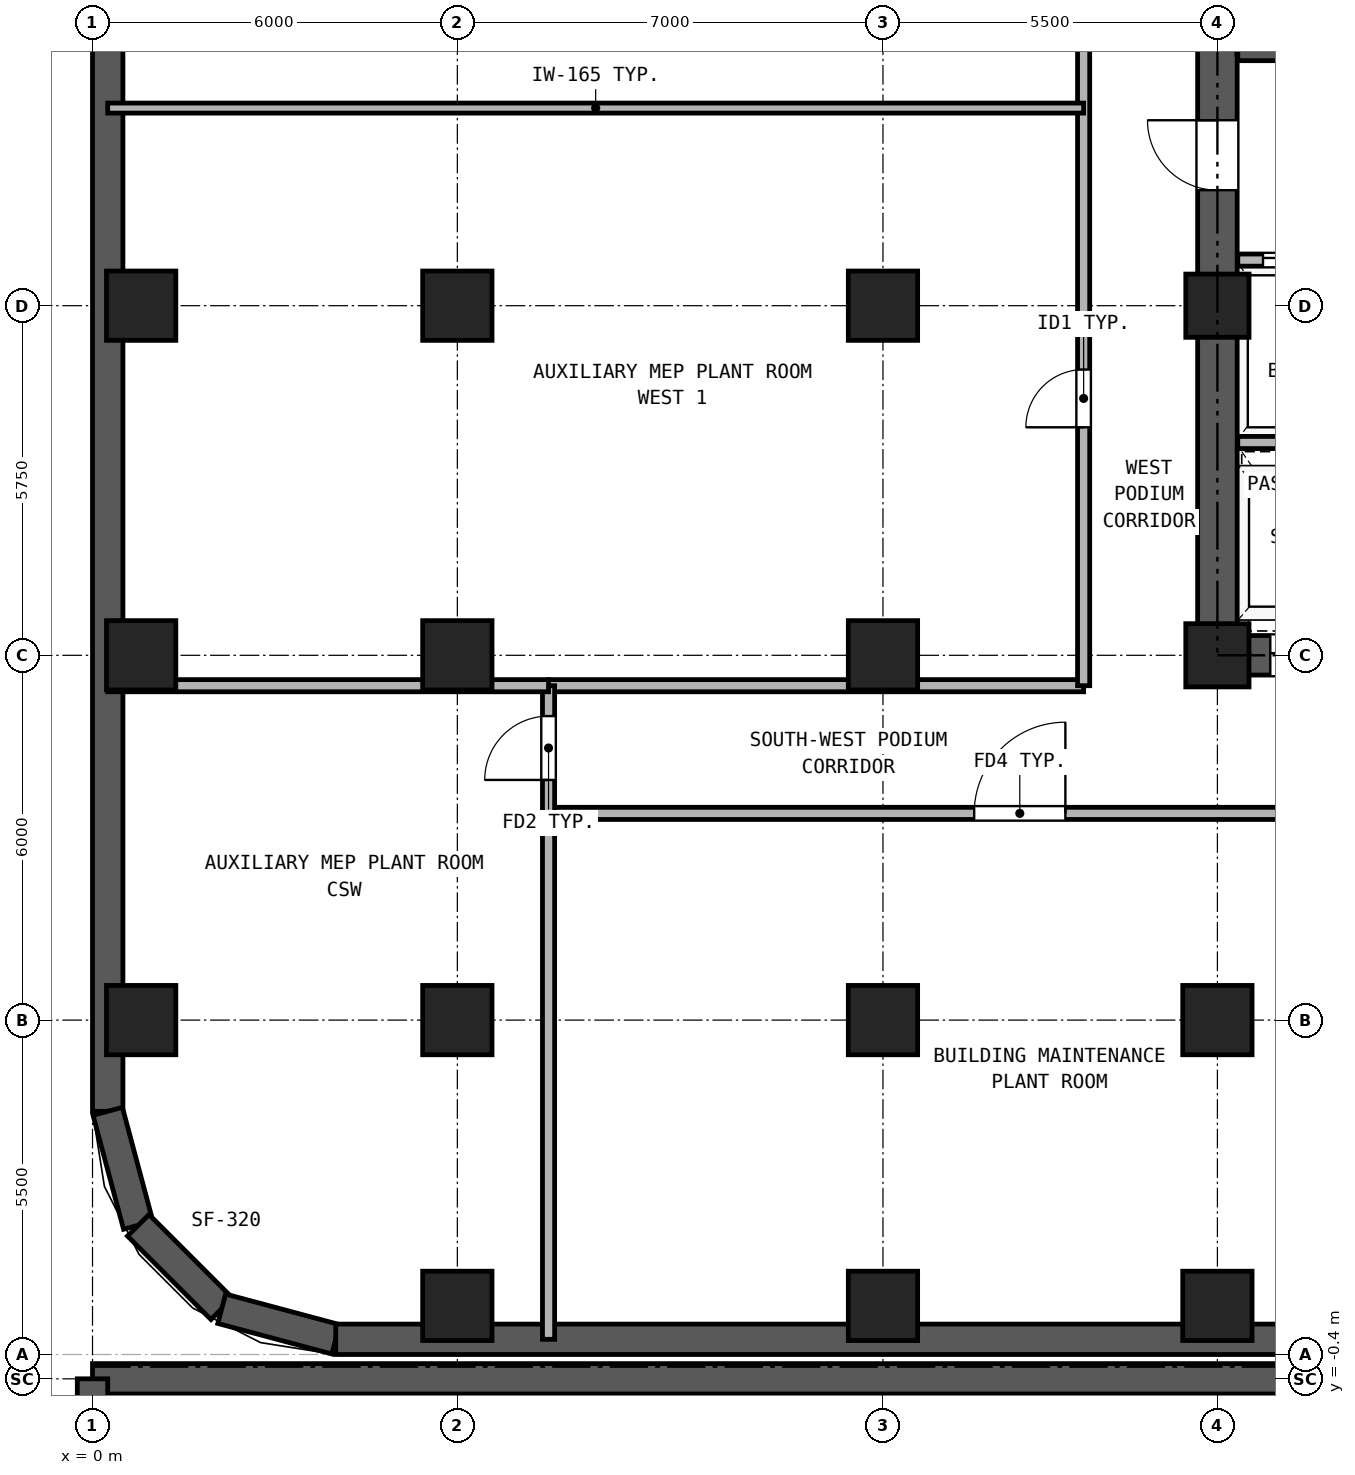
"""IFC4 building model, lengths in metres.
Left out: names, types, materials, properties, quantities, classifications, styles, units other than length and angle.
Written with IfcOpenShell. Run it as: python <this file> out.ifc"""

import sys

from ifc_helpers import new_model, si_unit, direction, frame, frame_2d, origin, origin_2d, place, context, subcontext, project, spatial, rectangle, hollow_rectangle, extrude, source, transform, mapped, element, fill, save


model = new_model("IFC4")
c1 = context("Model", 3, precision=1e-05, world=origin(), true_north=direction((0.0, 1.0)))
c2 = subcontext(c1, "Body", "Model", "MODEL_VIEW")
j1 = project(units=[si_unit("LENGTHUNIT", "METRE"), si_unit("PLANEANGLEUNIT", "RADIAN")], contexts=[c1])
p1 = place(None, origin())
s1 = spatial("IfcSite", under=j1, at=p1, CompositionType="ELEMENT")
p2 = place(p1, origin())
s2 = spatial("IfcBuilding", under=s1, at=p2, CompositionType="ELEMENT")
p3 = place(p2, frame((0.0, 0.0, -4.2)))
s3 = spatial("IfcBuildingStorey", under=s2, at=p3, CompositionType="ELEMENT", Elevation=-4.2)
m1 = source(origin(), c2, "Body", "SweptSolid", [
    extrude(hollow_rectangle(XDim=1.14, YDim=1.14, WallThickness=0.07, at=origin_2d()), origin(), (0.0, 0.0, 1.0), 3.88),
])
for number, where, z_axis, x_axis in (
    (1, (6.0, 0.8, 0.0), (0.0, 0.0, 1.0), (1.0, 0.0, 0.0)),
    (2, (13.0, 0.8, 0.0), (0.0, 0.0, 1.0), (1.0, 0.0, 0.0)),
    (3, (18.5, 0.8, 0.0), (0.0, 0.0, 1.0), (1.0, 0.0, 0.0)),
    (4, (0.8, 5.5, 0.0), (0.0, 0.0, 1.0), (1.0, 0.0, 0.0)),
    (5, (0.8, 11.5, 0.0), (0.0, 0.0, 1.0), (1.0, 0.0, 0.0)),
    (6, (0.8, 17.25, 0.0), (0.0, 0.0, 1.0), (1.0, 0.0, 0.0)),
    (7, (6.0, 5.5, 0.0), (0.0, 0.0, 1.0), (1.0, 0.0, 0.0)),
    (8, (6.0, 11.5, 0.0), (0.0, 0.0, 1.0), (1.0, 0.0, 0.0)),
    (9, (6.0, 17.25, 0.0), (0.0, 0.0, 1.0), (1.0, 0.0, 0.0)),
    (10, (13.0, 5.5, 0.0), (0.0, 0.0, 1.0), (1.0, 0.0, 0.0)),
    (11, (13.0, 11.5, 0.0), (0.0, 0.0, 1.0), (1.0, 0.0, 0.0)),
    (12, (13.0, 17.25, 0.0), (0.0, 0.0, 1.0), (1.0, 0.0, 0.0)),
    (13, (18.5, 5.5, 0.0), (0.0, 0.0, 1.0), (1.0, 0.0, 0.0)),
):
    element("IfcColumn", number, at=place(p3, frame(where, z_axis=z_axis, x_axis=x_axis)), inside=s3, PredefinedType="COLUMN", context=c2, shape_type="MappedRepresentation", body=[
        mapped(m1, transform((0.0, 0.0, 0.0), x_axis=(1.0, 0.0, 0.0), y_axis=(0.0, 1.0, 0.0), z_axis=(0.0, 0.0, 1.0), scale=1.0)),
    ])
m2 = source(origin(), c2, "Body", "SweptSolid", [
    extrude(hollow_rectangle(XDim=1.04, YDim=1.04, WallThickness=0.065, at=origin_2d()), origin(), (0.0, 0.0, 1.0), 3.88),
])
for number, where, z_axis, x_axis in (
    (14, (18.5, 11.5, 0.0), (0.0, 0.0, 1.0), (1.0, 0.0, 0.0)),
    (15, (18.5, 17.25, 0.0), (0.0, 0.0, 1.0), (1.0, 0.0, 0.0)),
):
    element("IfcColumn", number, at=place(p3, frame(where, z_axis=z_axis, x_axis=x_axis)), inside=s3, PredefinedType="COLUMN", context=c2, shape_type="MappedRepresentation", body=[
        mapped(m2, transform((0.0, 0.0, 0.0), x_axis=(1.0, 0.0, 0.0), y_axis=(0.0, 1.0, 0.0), z_axis=(0.0, 0.0, 1.0), scale=1.0)),
    ])
p4 = place(p3, frame((0.25, 36.5, 0.0), z_axis=(0.0, 0.0, 1.0), x_axis=(0.0, -1.0, 0.0)))
e16 = element("IfcWall", 16, at=p4, inside=s3, PredefinedType="USERDEFINED", context=c2, shape_type="SweptSolid", body=[
    extrude(rectangle(XDim=32.5, YDim=0.5, at=frame_2d((16.25, 0.0))), origin(), (0.0, 0.0, 1.0), 3.88),
])
for number, where, z_axis, x_axis in (
    (17, (0.25, 4.0, 0.0), (0.0, 0.0, 1.0), (0.259, -0.966, 0.0)),
    (18, (0.752, 2.125, 0.0), (0.0, 0.0, 1.0), (0.707, -0.707, 0.0)),
    (19, (2.125, 0.752, 0.0), (0.0, 0.0, 1.0), (0.966, -0.259, 0.0)),
):
    element("IfcWall", number, at=place(p3, frame(where, z_axis=z_axis, x_axis=x_axis)), inside=s3, PredefinedType="USERDEFINED", context=c2, shape_type="SweptSolid", body=[
        extrude(rectangle(XDim=1.941, YDim=0.5, at=frame_2d((0.971, 0.0))), origin(), (0.0, 0.0, 1.0), 3.88),
    ])
p5 = place(p3, frame((4.0, 0.25, 0.0), z_axis=(0.0, 0.0, 1.0), x_axis=(1.0, 0.0, 0.0)))
e20 = element("IfcWall", 20, at=p5, inside=s3, PredefinedType="USERDEFINED", context=c2, shape_type="SweptSolid", body=[
    extrude(rectangle(XDim=39.0, YDim=0.5, at=frame_2d((19.5, 0.0))), origin(), (0.0, 0.0, 1.0), 3.88),
])
p6 = place(p3, frame((47.4, -0.4, 0.0), z_axis=(0.0, 0.0, 1.0), x_axis=(-1.0, 0.0, 0.0)))
e21 = element("IfcWall", 21, at=p6, inside=s3, PredefinedType="USERDEFINED", context=c2, shape_type="SweptSolid", body=[
    extrude(rectangle(XDim=47.4, YDim=0.5, at=frame_2d((23.7, 0.0))), origin(), (0.0, 0.0, 1.0), 3.88),
])
p7 = place(p3, frame((0.0, -0.4, 0.0), z_axis=(0.0, 0.0, 1.0), x_axis=(0.0, -1.0, 0.0)))
e22 = element("IfcWall", 22, at=p7, inside=s3, PredefinedType="USERDEFINED", context=c2, shape_type="SweptSolid", body=[
    extrude(rectangle(XDim=10.7, YDim=0.5, at=frame_2d((5.35, 0.0))), origin(), (0.0, 0.0, 1.0), 3.88),
])
p8 = place(p3, frame((18.175, 11.5, 0.0), z_axis=(0.0, 0.0, 1.0), x_axis=(1.0, 0.0, 0.0)))
e23 = element("IfcWall", 23, at=p8, inside=s3, PredefinedType="SHEAR", context=c2, shape_type="SweptSolid", body=[
    extrude(rectangle(XDim=10.65, YDim=0.65, at=frame_2d((5.325, 0.0))), origin(), (0.0, 0.0, 1.0), 3.88),
])
p9 = place(p8, frame((1.195, 0.0, 0.0)))
e24 = element("IfcOpeningElement", 24, at=p9, cuts=e23, PredefinedType="OPENING", context=c2, shape_type="SweptSolid", body=[
    extrude(rectangle(XDim=1.1, YDim=2.25, at=frame_2d((0.55, 1.125))), frame((0.0, 0.335, 0.0), z_axis=(0.0, -1.0, 0.0), x_axis=(1.0, 0.0, 0.0)), (0.0, 0.0, 1.0), 0.67),
])
p10 = place(p8, frame((3.495, 0.0, 0.0)))
e25 = element("IfcOpeningElement", 25, at=p10, cuts=e23, PredefinedType="OPENING", context=c2, shape_type="SweptSolid", body=[
    extrude(rectangle(XDim=1.1, YDim=2.25, at=frame_2d((0.55, 1.125))), frame((0.0, 0.335, 0.0), z_axis=(0.0, -1.0, 0.0), x_axis=(1.0, 0.0, 0.0)), (0.0, 0.0, 1.0), 0.67),
])
p11 = place(p8, frame((5.925, 0.0, 0.0)))
e26 = element("IfcOpeningElement", 26, at=p11, cuts=e23, PredefinedType="OPENING", context=c2, shape_type="SweptSolid", body=[
    extrude(rectangle(XDim=1.05, YDim=2.15, at=frame_2d((0.525, 1.075))), frame((0.0, 0.335, 0.0), z_axis=(0.0, -1.0, 0.0), x_axis=(1.0, 0.0, 0.0)), (0.0, 0.0, 1.0), 0.67),
])
p12 = place(p8, frame((8.325, 0.0, 0.0)))
e27 = element("IfcOpeningElement", 27, at=p12, cuts=e23, PredefinedType="OPENING", context=c2, shape_type="SweptSolid", body=[
    extrude(rectangle(XDim=1.05, YDim=2.15, at=frame_2d((0.525, 1.075))), frame((0.0, 0.335, 0.0), z_axis=(0.0, -1.0, 0.0), x_axis=(1.0, 0.0, 0.0)), (0.0, 0.0, 1.0), 0.67),
])
p13 = place(p3, frame((18.5, 11.825, 0.0), z_axis=(0.0, 0.0, 1.0), x_axis=(0.0, 1.0, 0.0)))
e28 = element("IfcWall", 28, at=p13, inside=s3, PredefinedType="SHEAR", context=c2, shape_type="SweptSolid", body=[
    extrude(rectangle(XDim=16.6, YDim=0.65, at=frame_2d((8.3, 0.0))), origin(), (0.0, 0.0, 1.0), 3.88),
])
p14 = place(p13, frame((7.325, 0.0, 0.0)))
e29 = element("IfcOpeningElement", 29, at=p14, cuts=e28, PredefinedType="OPENING", context=c2, shape_type="SweptSolid", body=[
    extrude(rectangle(XDim=1.15, YDim=2.2, at=frame_2d((0.575, 1.1))), frame((0.0, 0.335, 0.0), z_axis=(0.0, -1.0, 0.0), x_axis=(1.0, 0.0, 0.0)), (0.0, 0.0, 1.0), 0.67),
])
p15 = place(p3, frame((18.93, 21.39, 0.0), z_axis=(0.0, 0.0, 1.0), x_axis=(0.0, 1.0, 0.0)))
e30 = element("IfcWall", 30, at=p15, inside=s3, PredefinedType="SOLIDWALL", context=c2, shape_type="SweptSolid", body=[
    extrude(rectangle(XDim=7.11, YDim=0.22, at=frame_2d((3.555, 0.0))), origin(), (0.0, 0.0, 1.0), 3.88),
])
p16 = place(p3, frame((18.835, 21.39, 0.0), z_axis=(0.0, 0.0, 1.0), x_axis=(1.0, 0.0, 0.0)))
e31 = element("IfcWall", 31, at=p16, inside=s3, PredefinedType="SOLIDWALL", context=c2, shape_type="SweptSolid", body=[
    extrude(rectangle(XDim=6.295, YDim=0.22, at=frame_2d((3.147, 0.0))), origin(), (0.0, 0.0, 1.0), 3.88),
])
p17 = place(p16, frame((1.015, 0.0, 0.0)))
e32 = element("IfcOpeningElement", 32, at=p17, cuts=e31, PredefinedType="OPENING", context=c2, shape_type="SweptSolid", body=[
    extrude(rectangle(XDim=1.15, YDim=2.2, at=frame_2d((0.575, 1.1))), frame((0.0, 0.12, 0.0), z_axis=(0.0, -1.0, 0.0), x_axis=(1.0, 0.0, 0.0)), (0.0, 0.0, 1.0), 0.24),
])
p18 = place(p16, frame((4.745, 0.0, 0.0)))
e33 = element("IfcOpeningElement", 33, at=p18, cuts=e31, PredefinedType="OPENING", context=c2, shape_type="SweptSolid", body=[
    extrude(rectangle(XDim=1.1, YDim=2.25, at=frame_2d((0.55, 1.125))), frame((0.0, 0.12, 0.0), z_axis=(0.0, -1.0, 0.0), x_axis=(1.0, 0.0, 0.0)), (0.0, 0.0, 1.0), 0.24),
])
p19 = place(p3, frame((18.835, 18.0, 0.0), z_axis=(0.0, 0.0, 1.0), x_axis=(1.0, 0.0, 0.0)))
e34 = element("IfcWall", 34, at=p19, inside=s3, PredefinedType="PARTITIONING", context=c2, shape_type="SweptSolid", body=[
    extrude(rectangle(XDim=9.33, YDim=0.2, at=frame_2d((4.665, 0.0))), origin(), (0.0, 0.0, 1.0), 3.88),
])
p20 = place(p19, frame((0.415, 0.0, 0.0)))
e35 = element("IfcOpeningElement", 35, at=p20, cuts=e34, PredefinedType="OPENING", context=c2, shape_type="SweptSolid", body=[
    extrude(rectangle(XDim=1.3, YDim=2.3, at=frame_2d((0.65, 1.15))), frame((0.0, 0.11, 0.0), z_axis=(0.0, -1.0, 0.0), x_axis=(1.0, 0.0, 0.0)), (0.0, 0.0, 1.0), 0.22),
])
p21 = place(p19, frame((2.515, 0.0, 0.0)))
e36 = element("IfcOpeningElement", 36, at=p21, cuts=e34, PredefinedType="OPENING", context=c2, shape_type="SweptSolid", body=[
    extrude(rectangle(XDim=1.3, YDim=2.3, at=frame_2d((0.65, 1.15))), frame((0.0, 0.11, 0.0), z_axis=(0.0, -1.0, 0.0), x_axis=(1.0, 0.0, 0.0)), (0.0, 0.0, 1.0), 0.22),
])
p22 = place(p19, frame((7.015, 0.0, 0.0)))
e37 = element("IfcOpeningElement", 37, at=p22, cuts=e34, PredefinedType="OPENING", context=c2, shape_type="SweptSolid", body=[
    extrude(rectangle(XDim=1.0, YDim=2.15, at=frame_2d((0.5, 1.075))), frame((0.0, 0.11, 0.0), z_axis=(0.0, -1.0, 0.0), x_axis=(1.0, 0.0, 0.0)), (0.0, 0.0, 1.0), 0.22),
])
p23 = place(p3, frame((18.835, 15.0, 0.0), z_axis=(0.0, 0.0, 1.0), x_axis=(1.0, 0.0, 0.0)))
e38 = element("IfcWall", 38, at=p23, inside=s3, PredefinedType="PARTITIONING", context=c2, shape_type="SweptSolid", body=[
    extrude(rectangle(XDim=9.33, YDim=0.2, at=frame_2d((4.665, 0.0))), origin(), (0.0, 0.0, 1.0), 3.88),
])
p24 = place(p3, frame((7.5, 8.9, 0.0), z_axis=(0.0, 0.0, 1.0), x_axis=(1.0, 0.0, 0.0)))
e39 = element("IfcWall", 39, at=p24, inside=s3, PredefinedType="PARTITIONING", context=c2, shape_type="SweptSolid", body=[
    extrude(rectangle(XDim=32.0, YDim=0.2, at=frame_2d((16.0, 0.0))), origin(), (0.0, 0.0, 1.0), 3.88),
])
p25 = place(p24, frame((7.0, 0.0, 0.0)))
e40 = element("IfcOpeningElement", 40, at=p25, cuts=e39, PredefinedType="OPENING", context=c2, shape_type="SweptSolid", body=[
    extrude(rectangle(XDim=1.5, YDim=2.25, at=frame_2d((0.75, 1.125))), frame((0.0, 0.11, 0.0), z_axis=(0.0, -1.0, 0.0), x_axis=(1.0, 0.0, 0.0)), (0.0, 0.0, 1.0), 0.22),
])
p26 = place(p24, frame((21.65, 0.0, 0.0)))
e41 = element("IfcOpeningElement", 41, at=p26, cuts=e39, PredefinedType="OPENING", context=c2, shape_type="SweptSolid", body=[
    extrude(rectangle(XDim=1.5, YDim=2.25, at=frame_2d((0.75, 1.125))), frame((0.0, 0.11, 0.0), z_axis=(0.0, -1.0, 0.0), x_axis=(1.0, 0.0, 0.0)), (0.0, 0.0, 1.0), 0.22),
])
p27 = place(p24, frame((30.15, 0.0, 0.0)))
e42 = element("IfcOpeningElement", 42, at=p27, cuts=e39, PredefinedType="OPENING", context=c2, shape_type="SweptSolid", body=[
    extrude(rectangle(XDim=0.92, YDim=2.1, at=frame_2d((0.46, 1.05))), frame((0.0, 0.11, 0.0), z_axis=(0.0, -1.0, 0.0), x_axis=(1.0, 0.0, 0.0)), (0.0, 0.0, 1.0), 0.22),
])
p28 = place(p3, frame((7.5, 11.0, 0.0), z_axis=(0.0, 0.0, 1.0), x_axis=(1.0, 0.0, 0.0)))
e43 = element("IfcWall", 43, at=p28, inside=s3, PredefinedType="PARTITIONING", context=c2, shape_type="SweptSolid", body=[
    extrude(rectangle(XDim=8.8, YDim=0.2, at=frame_2d((4.4, 0.0))), origin(), (0.0, 0.0, 1.0), 3.88),
])
p29 = place(p3, frame((16.3, 11.0, 0.0), z_axis=(0.0, 0.0, 1.0), x_axis=(0.0, 1.0, 0.0)))
e44 = element("IfcWall", 44, at=p29, inside=s3, PredefinedType="PARTITIONING", context=c2, shape_type="SweptSolid", body=[
    extrude(rectangle(XDim=18.25, YDim=0.2, at=frame_2d((9.125, 0.0))), origin(), (0.0, 0.0, 1.0), 3.88),
])
p30 = place(p29, frame((4.25, 0.0, 0.0)))
e45 = element("IfcOpeningElement", 45, at=p30, cuts=e44, PredefinedType="OPENING", context=c2, shape_type="SweptSolid", body=[
    extrude(rectangle(XDim=0.95, YDim=2.15, at=frame_2d((0.475, 1.075))), frame((0.0, 0.11, 0.0), z_axis=(0.0, -1.0, 0.0), x_axis=(1.0, 0.0, 0.0)), (0.0, 0.0, 1.0), 0.22),
])
p31 = place(p29, frame((13.375, 0.0, 0.0)))
e46 = element("IfcOpeningElement", 46, at=p31, cuts=e44, PredefinedType="OPENING", context=c2, shape_type="SweptSolid", body=[
    extrude(rectangle(XDim=0.95, YDim=2.15, at=frame_2d((0.475, 1.075))), frame((0.0, 0.11, 0.0), z_axis=(0.0, -1.0, 0.0), x_axis=(1.0, 0.0, 0.0)), (0.0, 0.0, 1.0), 0.22),
])
p32 = place(p3, frame((7.5, 0.25, 0.0), z_axis=(0.0, 0.0, 1.0), x_axis=(0.0, 1.0, 0.0)))
e47 = element("IfcWall", 47, at=p32, inside=s3, PredefinedType="PARTITIONING", context=c2, shape_type="SweptSolid", body=[
    extrude(rectangle(XDim=10.75, YDim=0.2, at=frame_2d((5.375, 0.0))), origin(), (0.0, 0.0, 1.0), 3.88),
])
p33 = place(p32, frame((9.2, 0.0, 0.0)))
e48 = element("IfcOpeningElement", 48, at=p33, cuts=e47, PredefinedType="OPENING", context=c2, shape_type="SweptSolid", body=[
    extrude(rectangle(XDim=1.05, YDim=2.15, at=frame_2d((0.525, 1.075))), frame((0.0, 0.11, 0.0), z_axis=(0.0, -1.0, 0.0), x_axis=(1.0, 0.0, 0.0)), (0.0, 0.0, 1.0), 0.22),
])
p34 = place(p3, frame((0.25, 11.0, 0.0), z_axis=(0.0, 0.0, 1.0), x_axis=(1.0, 0.0, 0.0)))
e49 = element("IfcWall", 49, at=p34, inside=s3, PredefinedType="PARTITIONING", context=c2, shape_type="SweptSolid", body=[
    extrude(rectangle(XDim=7.25, YDim=0.2, at=frame_2d((3.625, 0.0))), origin(), (0.0, 0.0, 1.0), 3.88),
])
p35 = place(p3, frame((0.25, 20.5, 0.0), z_axis=(0.0, 0.0, 1.0), x_axis=(1.0, 0.0, 0.0)))
e50 = element("IfcWall", 50, at=p35, inside=s3, PredefinedType="PARTITIONING", context=c2, shape_type="SweptSolid", body=[
    extrude(rectangle(XDim=16.05, YDim=0.165, at=frame_2d((8.025, 0.0))), origin(), (0.0, 0.0, 1.0), 3.88),
])
p36 = place(p20, origin())
e51 = element("IfcDoor", 51, at=p36, inside=s3, OperationType="DOUBLE_DOOR_SLIDING", PredefinedType="DOOR", context=c2, shape_type="SweptSolid", body=[
    extrude(rectangle(XDim=1.3, YDim=2.3, at=frame_2d((0.65, 1.15))), frame((0.0, 0.025, 0.0), z_axis=(0.0, -1.0, 0.0), x_axis=(1.0, 0.0, 0.0)), (0.0, 0.0, 1.0), 0.05),
])
fill(e35, e51)
p37 = place(p14, frame((1.15, 0.0, 0.0), z_axis=(0.0, 0.0, 1.0), x_axis=(-1.0, 0.0, 0.0)))
e52 = element("IfcDoor", 52, at=p37, inside=s3, OperationType="SINGLE_SWING_RIGHT", PredefinedType="DOOR", context=c2, shape_type="SweptSolid", body=[
    extrude(rectangle(XDim=1.15, YDim=2.2, at=frame_2d((0.575, 1.1))), frame((0.0, 0.025, 0.0), z_axis=(0.0, -1.0, 0.0), x_axis=(1.0, 0.0, 0.0)), (0.0, 0.0, 1.0), 0.05),
])
fill(e29, e52)
p38 = place(p9, frame((1.1, 0.0, 0.0), z_axis=(0.0, 0.0, 1.0), x_axis=(-1.0, 0.0, 0.0)))
e53 = element("IfcDoor", 53, at=p38, inside=s3, OperationType="DOUBLE_DOOR_SLIDING", PredefinedType="DOOR", context=c2, shape_type="SweptSolid", body=[
    extrude(rectangle(XDim=1.1, YDim=2.25, at=frame_2d((0.55, 1.125))), frame((0.0, 0.025, 0.0), z_axis=(0.0, -1.0, 0.0), x_axis=(1.0, 0.0, 0.0)), (0.0, 0.0, 1.0), 0.05),
])
fill(e24, e53)
p39 = place(p25, frame((1.5, 0.0, 0.0), z_axis=(0.0, 0.0, 1.0), x_axis=(-1.0, 0.0, 0.0)))
e54 = element("IfcDoor", 54, at=p39, inside=s3, OperationType="SINGLE_SWING_RIGHT", PredefinedType="DOOR", context=c2, shape_type="SweptSolid", body=[
    extrude(rectangle(XDim=1.5, YDim=2.25, at=frame_2d((0.75, 1.125))), frame((0.0, 0.025, 0.0), z_axis=(0.0, -1.0, 0.0), x_axis=(1.0, 0.0, 0.0)), (0.0, 0.0, 1.0), 0.05),
])
fill(e40, e54)
p40 = place(p33, frame((1.05, 0.0, 0.0), z_axis=(0.0, 0.0, 1.0), x_axis=(-1.0, 0.0, 0.0)))
e55 = element("IfcDoor", 55, at=p40, inside=s3, OperationType="SINGLE_SWING_LEFT", PredefinedType="DOOR", context=c2, shape_type="SweptSolid", body=[
    extrude(rectangle(XDim=1.05, YDim=2.15, at=frame_2d((0.525, 1.075))), frame((0.0, 0.025, 0.0), z_axis=(0.0, -1.0, 0.0), x_axis=(1.0, 0.0, 0.0)), (0.0, 0.0, 1.0), 0.05),
])
fill(e48, e55)
p41 = place(p30, frame((0.95, 0.0, 0.0), z_axis=(0.0, 0.0, 1.0), x_axis=(-1.0, 0.0, 0.0)))
e56 = element("IfcDoor", 56, at=p41, inside=s3, OperationType="SINGLE_SWING_LEFT", PredefinedType="DOOR", context=c2, shape_type="SweptSolid", body=[
    extrude(rectangle(XDim=0.95, YDim=2.15, at=frame_2d((0.475, 1.075))), frame((0.0, 0.025, 0.0), z_axis=(0.0, -1.0, 0.0), x_axis=(1.0, 0.0, 0.0)), (0.0, 0.0, 1.0), 0.05),
])
fill(e45, e56)
save(model, sys.argv[1])
